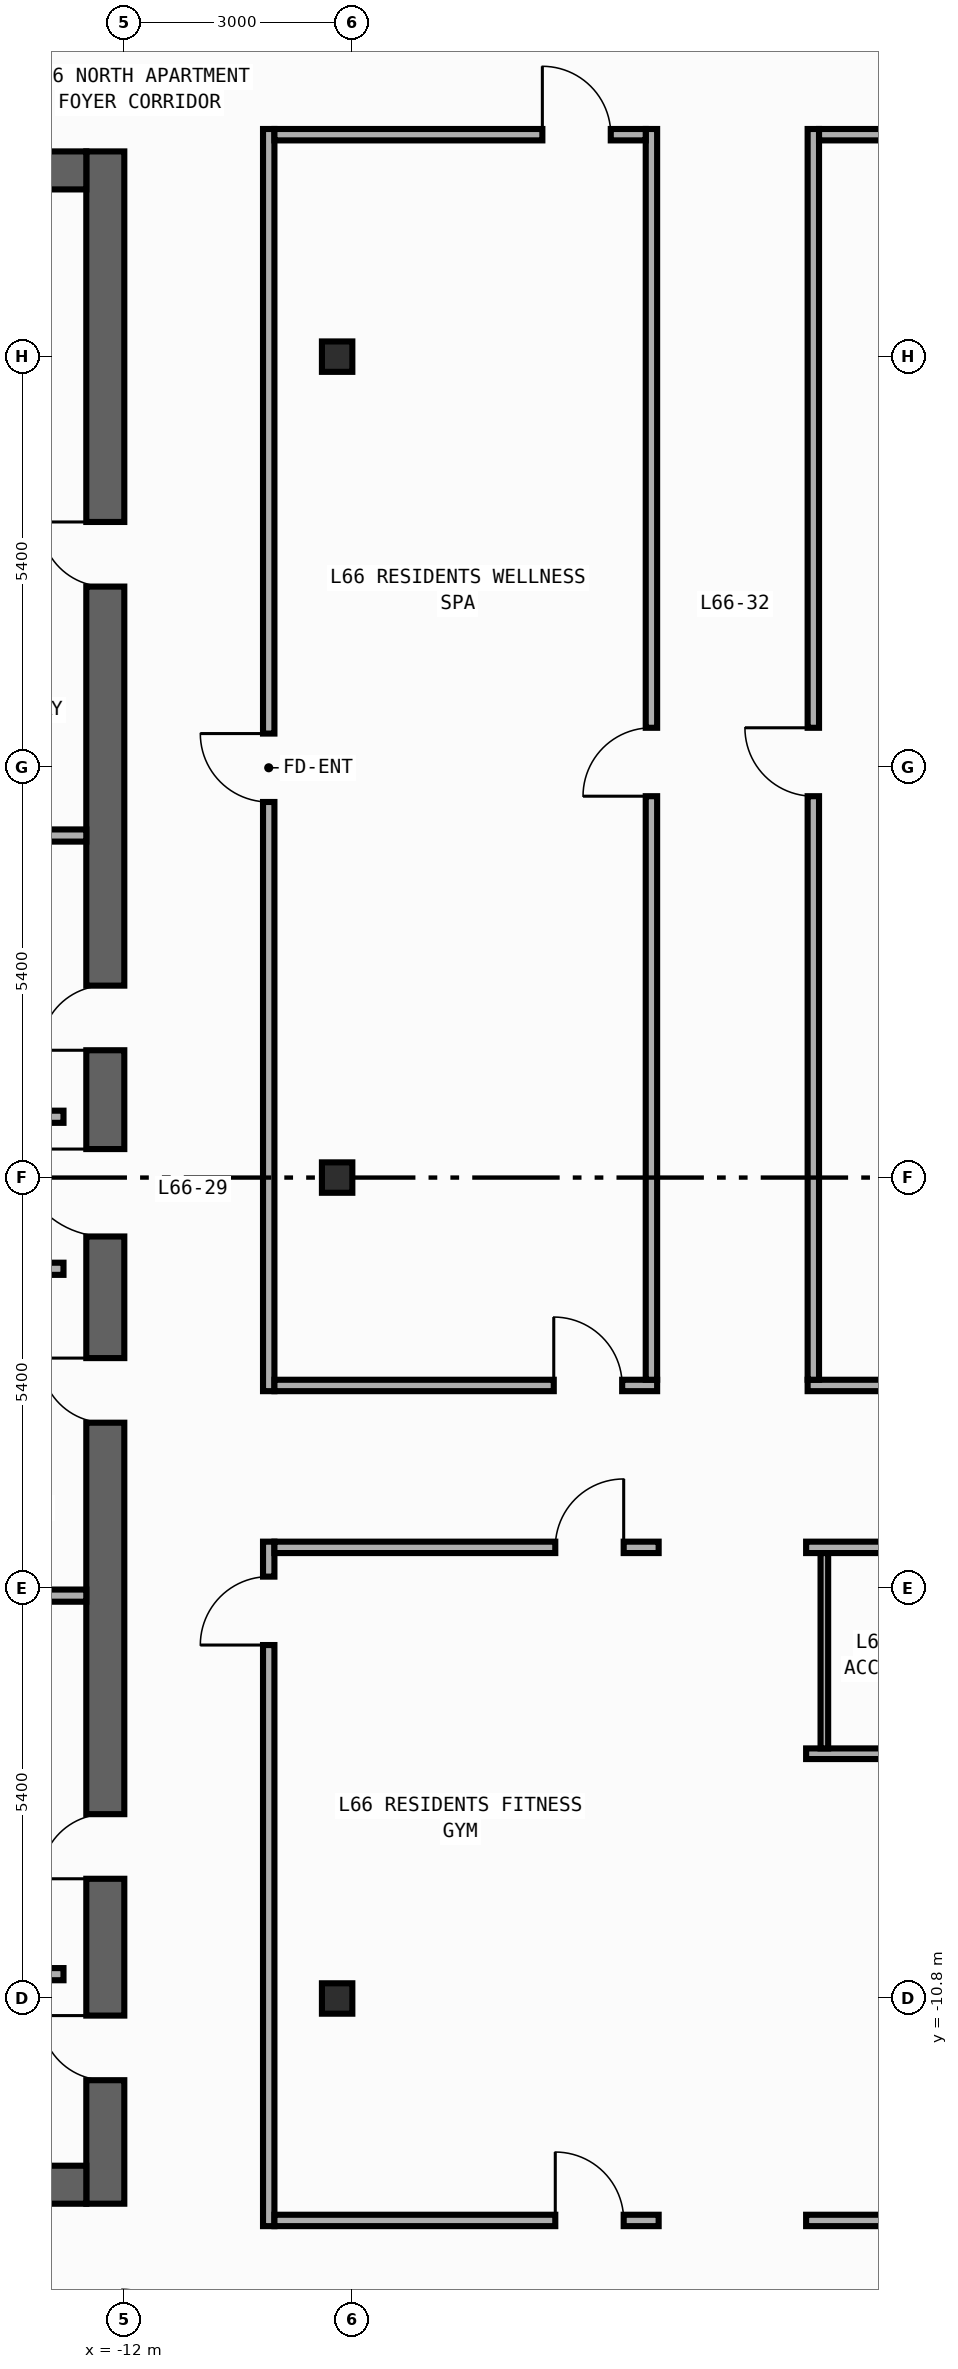
"""IFC4 building model, lengths in metres.
Left out: names, types, materials, properties, quantities, classifications, styles, units other than length and angle.
Written with IfcOpenShell. Run it as: python <this file> out.ifc"""

import sys

from ifc_helpers import new_model, si_unit, direction, frame, frame_2d, origin, origin_2d, place, context, subcontext, project, spatial, rectangle, i_section, extrude, element, fill, save


model = new_model("IFC4")
c1 = context("Model", 3, precision=1e-05, world=origin(), true_north=direction((0.0, 1.0)))
c2 = subcontext(c1, "Body", "Model", "MODEL_VIEW")
j1 = project(units=[si_unit("LENGTHUNIT", "METRE"), si_unit("PLANEANGLEUNIT", "RADIAN")], contexts=[c1])
p1 = place(None, origin())
s1 = spatial("IfcSite", under=j1, at=p1, CompositionType="ELEMENT")
p2 = place(p1, origin())
s2 = spatial("IfcBuilding", under=s1, at=p2, CompositionType="ELEMENT")
p3 = place(p2, frame((0.0, 0.0, 277.6)))
s3 = spatial("IfcBuildingStorey", under=s2, at=p3, CompositionType="ELEMENT", Elevation=277.6)
p4 = place(p3, frame((-12.25, -13.5, 0.0), z_axis=(0.0, 0.0, 1.0), x_axis=(0.0, 1.0, 0.0)))
e1 = element("IfcWall", 1, at=p4, inside=s3, PredefinedType="SHEAR", context=c2, shape_type="SweptSolid", body=[
    extrude(rectangle(XDim=27.0, YDim=0.5, at=frame_2d((13.5, 0.0))), origin(), (0.0, 0.0, 1.0), 3.54),
])
p5 = place(p4, frame((15.175, 0.0, 0.0)))
e2 = element("IfcOpeningElement", 2, at=p5, cuts=e1, PredefinedType="OPENING", context=c2, shape_type="SweptSolid", body=[
    extrude(rectangle(XDim=0.85, YDim=2.1, at=frame_2d((0.425, 1.05))), frame((0.0, 0.26, 0.0), z_axis=(0.0, -1.0, 0.0), x_axis=(1.0, 0.0, 0.0)), (0.0, 0.0, 1.0), 0.52),
])
p6 = place(p4, frame((21.275, 0.0, 0.0)))
e3 = element("IfcOpeningElement", 3, at=p6, cuts=e1, PredefinedType="OPENING", context=c2, shape_type="SweptSolid", body=[
    extrude(rectangle(XDim=0.85, YDim=2.1, at=frame_2d((0.425, 1.05))), frame((0.0, 0.26, 0.0), z_axis=(0.0, -1.0, 0.0), x_axis=(1.0, 0.0, 0.0)), (0.0, 0.0, 1.0), 0.52),
])
p7 = place(p4, frame((4.275, 0.0, 0.0)))
e4 = element("IfcOpeningElement", 4, at=p7, cuts=e1, PredefinedType="OPENING", context=c2, shape_type="SweptSolid", body=[
    extrude(rectangle(XDim=0.85, YDim=2.1, at=frame_2d((0.425, 1.05))), frame((0.0, 0.26, 0.0), z_axis=(0.0, -1.0, 0.0), x_axis=(1.0, 0.0, 0.0)), (0.0, 0.0, 1.0), 0.52),
])
p8 = place(p4, frame((10.275, 0.0, 0.0)))
e5 = element("IfcOpeningElement", 5, at=p8, cuts=e1, PredefinedType="OPENING", context=c2, shape_type="SweptSolid", body=[
    extrude(rectangle(XDim=0.85, YDim=2.1, at=frame_2d((0.425, 1.05))), frame((0.0, 0.26, 0.0), z_axis=(0.0, -1.0, 0.0), x_axis=(1.0, 0.0, 0.0)), (0.0, 0.0, 1.0), 0.52),
])
p9 = place(p4, frame((12.725, 0.0, 0.0)))
e6 = element("IfcOpeningElement", 6, at=p9, cuts=e1, PredefinedType="OPENING", context=c2, shape_type="SweptSolid", body=[
    extrude(rectangle(XDim=1.15, YDim=2.2, at=frame_2d((0.575, 1.1))), frame((0.0, 0.26, 0.0), z_axis=(0.0, -1.0, 0.0), x_axis=(1.0, 0.0, 0.0)), (0.0, 0.0, 1.0), 0.52),
])
p10 = place(p4, frame((1.625, 0.0, 0.0)))
e7 = element("IfcOpeningElement", 7, at=p10, cuts=e1, PredefinedType="OPENING", context=c2, shape_type="SweptSolid", body=[
    extrude(rectangle(XDim=0.85, YDim=2.1, at=frame_2d((0.425, 1.05))), frame((0.0, 0.26, 0.0), z_axis=(0.0, -1.0, 0.0), x_axis=(1.0, 0.0, 0.0)), (0.0, 0.0, 1.0), 0.52),
])
for number, where, z_axis, x_axis in (
    (8, (-19.9, -13.25, 0.0), (0.0, 0.0, 1.0), (1.0, 0.0, 0.0)),
    (9, (-19.9, 13.25, 0.0), (0.0, 0.0, 1.0), (1.0, 0.0, 0.0)),
):
    element("IfcWall", number, at=place(p3, frame(where, z_axis=z_axis, x_axis=x_axis)), inside=s3, PredefinedType="SHEAR", context=c2, shape_type="SweptSolid", body=[
        extrude(rectangle(XDim=7.4, YDim=0.5, at=frame_2d((3.7, 0.0))), origin(), (0.0, 0.0, 1.0), 3.54),
    ])
for number, where, z_axis, x_axis in (
    (10, (-9.2, -10.8, 0.0), (0.0, 0.0, 1.0), (1.0, 0.0, 0.0)),
    (11, (-9.2, 0.0, 0.0), (0.0, 0.0, 1.0), (1.0, 0.0, 0.0)),
    (12, (-9.2, 10.8, 0.0), (0.0, 0.0, 1.0), (1.0, 0.0, 0.0)),
):
    element("IfcColumn", number, at=place(p3, frame(where, z_axis=z_axis, x_axis=x_axis)), inside=s3, PredefinedType="COLUMN", context=c2, shape_type="SweptSolid", body=[
        extrude(i_section(OverallWidth=0.4, OverallDepth=0.4, WebThickness=0.013, FlangeThickness=0.021, FilletRadius=0.022, at=origin_2d()), origin(), (0.0, 0.0, 1.0), 3.8),
    ])
for number, where, z_axis, x_axis in (
    (13, (-15.4, 0.8, 0.0), (0.0, 0.0, 1.0), (1.0, 0.0, 0.0)),
    (14, (-15.4, -1.2, 0.0), (0.0, 0.0, 1.0), (1.0, 0.0, 0.0)),
    (15, (-15.4, -10.48, 0.0), (0.0, 0.0, 1.0), (1.0, 0.0, 0.0)),
):
    element("IfcWall", number, at=place(p3, frame(where, z_axis=z_axis, x_axis=x_axis)), inside=s3, PredefinedType="STANDARD", context=c2, shape_type="SweptSolid", body=[
        extrude(rectangle(XDim=2.6, YDim=0.16, at=frame_2d((1.3, 0.0))), origin(), (0.0, 0.0, 1.0), 3.54),
    ])
for number, where, z_axis, x_axis in (
    (16, (-15.4, 4.5, 0.0), (0.0, 0.0, 1.0), (1.0, 0.0, 0.0)),
    (17, (-15.4, -5.5, 0.0), (0.0, 0.0, 1.0), (1.0, 0.0, 0.0)),
):
    element("IfcWall", number, at=place(p3, frame(where, z_axis=z_axis, x_axis=x_axis)), inside=s3, PredefinedType="PARTITIONING", context=c2, shape_type="SweptSolid", body=[
        extrude(rectangle(XDim=2.9, YDim=0.16, at=frame_2d((1.45, 0.0))), origin(), (0.0, 0.0, 1.0), 3.54),
    ])
p11 = place(p3, frame((-10.1, -2.81, 0.0), z_axis=(0.0, 0.0, 1.0), x_axis=(0.0, 1.0, 0.0)))
e18 = element("IfcWall", 18, at=p11, inside=s3, PredefinedType="PARTITIONING", context=c2, shape_type="SweptSolid", body=[
    extrude(rectangle(XDim=16.605, YDim=0.15, at=frame_2d((8.302, 0.0))), origin(), (0.0, 0.0, 1.0), 3.54),
])
p12 = place(p11, frame((7.751, 0.0, 0.0)))
e19 = element("IfcOpeningElement", 19, at=p12, cuts=e18, PredefinedType="OPENING", context=c2, shape_type="SweptSolid", body=[
    extrude(rectangle(XDim=0.9, YDim=2.15, at=frame_2d((0.45, 1.075))), frame((0.0, 0.085, 0.0), z_axis=(0.0, -1.0, 0.0), x_axis=(1.0, 0.0, 0.0)), (0.0, 0.0, 1.0), 0.17),
])
p13 = place(p3, frame((-10.1, -13.795, 0.0), z_axis=(0.0, 0.0, 1.0), x_axis=(0.0, 1.0, 0.0)))
e20 = element("IfcWall", 20, at=p13, inside=s3, PredefinedType="PARTITIONING", context=c2, shape_type="SweptSolid", body=[
    extrude(rectangle(XDim=9.005, YDim=0.15, at=frame_2d((4.502, 0.0))), origin(), (0.0, 0.0, 1.0), 3.54),
])
p14 = place(p13, frame((7.645, 0.0, 0.0)))
e21 = element("IfcOpeningElement", 21, at=p14, cuts=e20, PredefinedType="OPENING", context=c2, shape_type="SweptSolid", body=[
    extrude(rectangle(XDim=0.9, YDim=2.15, at=frame_2d((0.45, 1.075))), frame((0.0, 0.085, 0.0), z_axis=(0.0, -1.0, 0.0), x_axis=(1.0, 0.0, 0.0)), (0.0, 0.0, 1.0), 0.17),
])
p15 = place(p3, frame((-10.025, -2.735, 0.0), z_axis=(0.0, 0.0, 1.0), x_axis=(1.0, 0.0, 0.0)))
e22 = element("IfcWall", 22, at=p15, inside=s3, PredefinedType="PARTITIONING", context=c2, shape_type="SweptSolid", body=[
    extrude(rectangle(XDim=5.035, YDim=0.15, at=frame_2d((2.518, 0.0))), origin(), (0.0, 0.0, 1.0), 3.54),
])
p16 = place(p15, frame((3.675, 0.0, 0.0)))
e23 = element("IfcOpeningElement", 23, at=p16, cuts=e22, PredefinedType="OPENING", context=c2, shape_type="SweptSolid", body=[
    extrude(rectangle(XDim=0.9, YDim=2.15, at=frame_2d((0.45, 1.075))), frame((0.0, 0.085, 0.0), z_axis=(0.0, -1.0, 0.0), x_axis=(1.0, 0.0, 0.0)), (0.0, 0.0, 1.0), 0.17),
])
p17 = place(p3, frame((-10.025, -4.865, 0.0), z_axis=(0.0, 0.0, 1.0), x_axis=(1.0, 0.0, 0.0)))
e24 = element("IfcWall", 24, at=p17, inside=s3, PredefinedType="PARTITIONING", context=c2, shape_type="SweptSolid", body=[
    extrude(rectangle(XDim=5.055, YDim=0.15, at=frame_2d((2.527, 0.0))), origin(), (0.0, 0.0, 1.0), 3.54),
])
p18 = place(p17, frame((3.695, 0.0, 0.0)))
e25 = element("IfcOpeningElement", 25, at=p18, cuts=e24, PredefinedType="OPENING", context=c2, shape_type="SweptSolid", body=[
    extrude(rectangle(XDim=0.9, YDim=2.15, at=frame_2d((0.45, 1.075))), frame((0.0, 0.085, 0.0), z_axis=(0.0, -1.0, 0.0), x_axis=(1.0, 0.0, 0.0)), (0.0, 0.0, 1.0), 0.17),
])
p19 = place(p3, frame((-3.01, -2.735, 0.0), z_axis=(0.0, 0.0, 1.0), x_axis=(1.0, 0.0, 0.0)))
e26 = element("IfcWall", 26, at=p19, inside=s3, PredefinedType="PARTITIONING", context=c2, shape_type="SweptSolid", body=[
    extrude(rectangle(XDim=13.035, YDim=0.15, at=frame_2d((6.518, 0.0))), origin(), (0.0, 0.0, 1.0), 3.54),
])
p20 = place(p19, frame((2.463, 0.0, 0.0)))
e27 = element("IfcOpeningElement", 27, at=p20, cuts=e26, PredefinedType="OPENING", context=c2, shape_type="SweptSolid", body=[
    extrude(rectangle(XDim=0.9, YDim=2.15, at=frame_2d((0.45, 1.075))), frame((0.0, 0.085, 0.0), z_axis=(0.0, -1.0, 0.0), x_axis=(1.0, 0.0, 0.0)), (0.0, 0.0, 1.0), 0.17),
])
p21 = place(p3, frame((-3.03, -4.865, 0.0), z_axis=(0.0, 0.0, 1.0), x_axis=(1.0, 0.0, 0.0)))
e28 = element("IfcWall", 28, at=p21, inside=s3, PredefinedType="PARTITIONING", context=c2, shape_type="SweptSolid", body=[
    extrude(rectangle(XDim=3.07, YDim=0.15, at=frame_2d((1.535, 0.0))), origin(), (0.0, 0.0, 1.0), 3.54),
])
p22 = place(p21, frame((1.71, 0.0, 0.0)))
e29 = element("IfcOpeningElement", 29, at=p22, cuts=e28, PredefinedType="OPENING", context=c2, shape_type="SweptSolid", body=[
    extrude(rectangle(XDim=0.9, YDim=2.15, at=frame_2d((0.45, 1.075))), frame((0.0, 0.085, 0.0), z_axis=(0.0, -1.0, 0.0), x_axis=(1.0, 0.0, 0.0)), (0.0, 0.0, 1.0), 0.17),
])
p23 = place(p3, frame((-5.065, -2.66, 0.0), z_axis=(0.0, 0.0, 1.0), x_axis=(0.0, 1.0, 0.0)))
e30 = element("IfcWall", 30, at=p23, inside=s3, PredefinedType="PARTITIONING", context=c2, shape_type="SweptSolid", body=[
    extrude(rectangle(XDim=16.455, YDim=0.15, at=frame_2d((8.228, 0.0))), origin(), (0.0, 0.0, 1.0), 3.19),
])
p24 = place(p23, frame((7.677, 0.0, 0.0)))
e31 = element("IfcOpeningElement", 31, at=p24, cuts=e30, PredefinedType="OPENING", context=c2, shape_type="SweptSolid", body=[
    extrude(rectangle(XDim=0.9, YDim=2.15, at=frame_2d((0.45, 1.075))), frame((0.0, 0.085, 0.0), z_axis=(0.0, -1.0, 0.0), x_axis=(1.0, 0.0, 0.0)), (0.0, 0.0, 1.0), 0.17),
])
p25 = place(p3, frame((-2.935, -2.66, 0.0), z_axis=(0.0, 0.0, 1.0), x_axis=(0.0, 1.0, 0.0)))
e32 = element("IfcWall", 32, at=p25, inside=s3, PredefinedType="PARTITIONING", context=c2, shape_type="SweptSolid", body=[
    extrude(rectangle(XDim=16.455, YDim=0.15, at=frame_2d((8.228, 0.0))), origin(), (0.0, 0.0, 1.0), 3.54),
])
p26 = place(p25, frame((7.677, 0.0, 0.0)))
e33 = element("IfcOpeningElement", 33, at=p26, cuts=e32, PredefinedType="OPENING", context=c2, shape_type="SweptSolid", body=[
    extrude(rectangle(XDim=0.9, YDim=2.15, at=frame_2d((0.45, 1.075))), frame((0.0, 0.085, 0.0), z_axis=(0.0, -1.0, 0.0), x_axis=(1.0, 0.0, 0.0)), (0.0, 0.0, 1.0), 0.17),
])
p27 = place(p3, frame((-10.025, 13.72, 0.0), z_axis=(0.0, 0.0, 1.0), x_axis=(1.0, 0.0, 0.0)))
e34 = element("IfcWall", 34, at=p27, inside=s3, PredefinedType="PARTITIONING", context=c2, shape_type="SweptSolid", body=[
    extrude(rectangle(XDim=4.885, YDim=0.15, at=frame_2d((2.442, 0.0))), origin(), (0.0, 0.0, 1.0), 3.54),
])
p28 = place(p27, frame((3.525, 0.0, 0.0)))
e35 = element("IfcOpeningElement", 35, at=p28, cuts=e34, PredefinedType="OPENING", context=c2, shape_type="SweptSolid", body=[
    extrude(rectangle(XDim=0.9, YDim=2.15, at=frame_2d((0.45, 1.075))), frame((0.0, 0.085, 0.0), z_axis=(0.0, -1.0, 0.0), x_axis=(1.0, 0.0, 0.0)), (0.0, 0.0, 1.0), 0.17),
])
p29 = place(p3, frame((-2.86, 13.72, 0.0), z_axis=(0.0, 0.0, 1.0), x_axis=(1.0, 0.0, 0.0)))
e36 = element("IfcWall", 36, at=p29, inside=s3, PredefinedType="PARTITIONING", context=c2, shape_type="SweptSolid", body=[
    extrude(rectangle(XDim=12.885, YDim=0.15, at=frame_2d((6.442, 0.0))), origin(), (0.0, 0.0, 1.0), 3.54),
])
p30 = place(p29, frame((4.692, 0.0, 0.0)))
e37 = element("IfcOpeningElement", 37, at=p30, cuts=e36, PredefinedType="OPENING", context=c2, shape_type="SweptSolid", body=[
    extrude(rectangle(XDim=0.9, YDim=2.15, at=frame_2d((0.45, 1.075))), frame((0.0, 0.085, 0.0), z_axis=(0.0, -1.0, 0.0), x_axis=(1.0, 0.0, 0.0)), (0.0, 0.0, 1.0), 0.17),
])
p31 = place(p3, frame((-10.025, -13.72, 0.0), z_axis=(0.0, 0.0, 1.0), x_axis=(1.0, 0.0, 0.0)))
e38 = element("IfcWall", 38, at=p31, inside=s3, PredefinedType="PARTITIONING", context=c2, shape_type="SweptSolid", body=[
    extrude(rectangle(XDim=5.055, YDim=0.15, at=frame_2d((2.527, 0.0))), origin(), (0.0, 0.0, 1.0), 3.54),
])
p32 = place(p31, frame((3.695, 0.0, 0.0)))
e39 = element("IfcOpeningElement", 39, at=p32, cuts=e38, PredefinedType="OPENING", context=c2, shape_type="SweptSolid", body=[
    extrude(rectangle(XDim=0.9, YDim=2.15, at=frame_2d((0.45, 1.075))), frame((0.0, 0.085, 0.0), z_axis=(0.0, -1.0, 0.0), x_axis=(1.0, 0.0, 0.0)), (0.0, 0.0, 1.0), 0.17),
])
p33 = place(p3, frame((-3.03, -13.72, 0.0), z_axis=(0.0, 0.0, 1.0), x_axis=(1.0, 0.0, 0.0)))
e40 = element("IfcWall", 40, at=p33, inside=s3, PredefinedType="PARTITIONING", context=c2, shape_type="SweptSolid", body=[
    extrude(rectangle(XDim=13.055, YDim=0.15, at=frame_2d((6.527, 0.0))), origin(), (0.0, 0.0, 1.0), 3.54),
])
p34 = place(p33, frame((4.874, 0.0, 0.0)))
e41 = element("IfcOpeningElement", 41, at=p34, cuts=e40, PredefinedType="OPENING", context=c2, shape_type="SweptSolid", body=[
    extrude(rectangle(XDim=0.9, YDim=2.15, at=frame_2d((0.45, 1.075))), frame((0.0, 0.085, 0.0), z_axis=(0.0, -1.0, 0.0), x_axis=(1.0, 0.0, 0.0)), (0.0, 0.0, 1.0), 0.17),
])
p35 = place(p3, frame((-3.03, -7.58, 0.0), z_axis=(0.0, 0.0, 1.0), x_axis=(1.0, 0.0, 0.0)))
e42 = element("IfcWall", 42, at=p35, inside=s3, PredefinedType="PARTITIONING", context=c2, shape_type="SweptSolid", body=[
    extrude(rectangle(XDim=3.07, YDim=0.14, at=frame_2d((1.535, 0.0))), origin(), (0.0, 0.0, 1.0), 3.54),
])
p36 = place(p3, frame((-2.79, -7.51, 0.0), z_axis=(0.0, 0.0, 1.0), x_axis=(0.0, 1.0, 0.0)))
e43 = element("IfcWall", 43, at=p36, inside=s3, PredefinedType="PARTITIONING", context=c2, shape_type="SweptSolid", body=[
    extrude(rectangle(XDim=2.57, YDim=0.1, at=frame_2d((1.285, 0.0))), origin(), (0.0, 0.0, 1.0), 3.54),
])
p37 = place(p5, origin())
e44 = element("IfcDoor", 44, at=p37, inside=s3, OperationType="SINGLE_SWING_LEFT", PredefinedType="DOOR", context=c2, shape_type="SweptSolid", body=[
    extrude(rectangle(XDim=0.85, YDim=2.1, at=frame_2d((0.425, 1.05))), frame((0.0, 0.025, 0.0), z_axis=(0.0, -1.0, 0.0), x_axis=(1.0, 0.0, 0.0)), (0.0, 0.0, 1.0), 0.05),
])
fill(e2, e44)
p38 = place(p6, origin())
e45 = element("IfcDoor", 45, at=p38, inside=s3, OperationType="SINGLE_SWING_RIGHT", PredefinedType="DOOR", context=c2, shape_type="SweptSolid", body=[
    extrude(rectangle(XDim=0.85, YDim=2.1, at=frame_2d((0.425, 1.05))), frame((0.0, 0.025, 0.0), z_axis=(0.0, -1.0, 0.0), x_axis=(1.0, 0.0, 0.0)), (0.0, 0.0, 1.0), 0.05),
])
fill(e3, e45)
p39 = place(p7, origin())
e46 = element("IfcDoor", 46, at=p39, inside=s3, OperationType="SINGLE_SWING_LEFT", PredefinedType="DOOR", context=c2, shape_type="SweptSolid", body=[
    extrude(rectangle(XDim=0.85, YDim=2.1, at=frame_2d((0.425, 1.05))), frame((0.0, 0.025, 0.0), z_axis=(0.0, -1.0, 0.0), x_axis=(1.0, 0.0, 0.0)), (0.0, 0.0, 1.0), 0.05),
])
fill(e4, e46)
p40 = place(p8, origin())
e47 = element("IfcDoor", 47, at=p40, inside=s3, OperationType="SINGLE_SWING_RIGHT", PredefinedType="DOOR", context=c2, shape_type="SweptSolid", body=[
    extrude(rectangle(XDim=0.85, YDim=2.1, at=frame_2d((0.425, 1.05))), frame((0.0, 0.025, 0.0), z_axis=(0.0, -1.0, 0.0), x_axis=(1.0, 0.0, 0.0)), (0.0, 0.0, 1.0), 0.05),
])
fill(e5, e47)
p41 = place(p9, origin())
e48 = element("IfcDoor", 48, at=p41, inside=s3, OperationType="SINGLE_SWING_RIGHT", PredefinedType="DOOR", context=c2, shape_type="SweptSolid", body=[
    extrude(rectangle(XDim=1.15, YDim=2.2, at=frame_2d((0.575, 1.1))), frame((0.0, 0.025, 0.0), z_axis=(0.0, -1.0, 0.0), x_axis=(1.0, 0.0, 0.0)), (0.0, 0.0, 1.0), 0.05),
])
fill(e6, e48)
p42 = place(p10, origin())
e49 = element("IfcDoor", 49, at=p42, inside=s3, OperationType="SINGLE_SWING_RIGHT", PredefinedType="DOOR", context=c2, shape_type="SweptSolid", body=[
    extrude(rectangle(XDim=0.85, YDim=2.1, at=frame_2d((0.425, 1.05))), frame((0.0, 0.025, 0.0), z_axis=(0.0, -1.0, 0.0), x_axis=(1.0, 0.0, 0.0)), (0.0, 0.0, 1.0), 0.05),
])
fill(e7, e49)
p43 = place(p12, origin())
e50 = element("IfcDoor", 50, at=p43, inside=s3, OperationType="SINGLE_SWING_RIGHT", PredefinedType="DOOR", context=c2, shape_type="SweptSolid", body=[
    extrude(rectangle(XDim=0.9, YDim=2.15, at=frame_2d((0.45, 1.075))), frame((0.0, 0.025, 0.0), z_axis=(0.0, -1.0, 0.0), x_axis=(1.0, 0.0, 0.0)), (0.0, 0.0, 1.0), 0.05),
])
fill(e19, e50)
p44 = place(p14, origin())
e51 = element("IfcDoor", 51, at=p44, inside=s3, OperationType="SINGLE_SWING_LEFT", PredefinedType="DOOR", context=c2, shape_type="SweptSolid", body=[
    extrude(rectangle(XDim=0.9, YDim=2.15, at=frame_2d((0.45, 1.075))), frame((0.0, 0.025, 0.0), z_axis=(0.0, -1.0, 0.0), x_axis=(1.0, 0.0, 0.0)), (0.0, 0.0, 1.0), 0.05),
])
fill(e21, e51)
p45 = place(p16, origin())
e52 = element("IfcDoor", 52, at=p45, inside=s3, OperationType="SINGLE_SWING_LEFT", PredefinedType="DOOR", context=c2, shape_type="SweptSolid", body=[
    extrude(rectangle(XDim=0.9, YDim=2.15, at=frame_2d((0.45, 1.075))), frame((0.0, 0.025, 0.0), z_axis=(0.0, -1.0, 0.0), x_axis=(1.0, 0.0, 0.0)), (0.0, 0.0, 1.0), 0.05),
])
fill(e23, e52)
p46 = place(p18, origin())
e53 = element("IfcDoor", 53, at=p46, inside=s3, OperationType="SINGLE_SWING_RIGHT", PredefinedType="DOOR", context=c2, shape_type="SweptSolid", body=[
    extrude(rectangle(XDim=0.9, YDim=2.15, at=frame_2d((0.45, 1.075))), frame((0.0, 0.025, 0.0), z_axis=(0.0, -1.0, 0.0), x_axis=(1.0, 0.0, 0.0)), (0.0, 0.0, 1.0), 0.05),
])
fill(e25, e53)
p47 = place(p24, origin())
e54 = element("IfcDoor", 54, at=p47, inside=s3, OperationType="SINGLE_SWING_LEFT", PredefinedType="DOOR", context=c2, shape_type="SweptSolid", body=[
    extrude(rectangle(XDim=0.9, YDim=2.15, at=frame_2d((0.45, 1.075))), frame((0.0, 0.025, 0.0), z_axis=(0.0, -1.0, 0.0), x_axis=(1.0, 0.0, 0.0)), (0.0, 0.0, 1.0), 0.05),
])
fill(e31, e54)
p48 = place(p26, origin())
e55 = element("IfcDoor", 55, at=p48, inside=s3, OperationType="SINGLE_SWING_RIGHT", PredefinedType="DOOR", context=c2, shape_type="SweptSolid", body=[
    extrude(rectangle(XDim=0.9, YDim=2.15, at=frame_2d((0.45, 1.075))), frame((0.0, 0.025, 0.0), z_axis=(0.0, -1.0, 0.0), x_axis=(1.0, 0.0, 0.0)), (0.0, 0.0, 1.0), 0.05),
])
fill(e33, e55)
p49 = place(p28, origin())
e56 = element("IfcDoor", 56, at=p49, inside=s3, OperationType="SINGLE_SWING_LEFT", PredefinedType="DOOR", context=c2, shape_type="SweptSolid", body=[
    extrude(rectangle(XDim=0.9, YDim=2.15, at=frame_2d((0.45, 1.075))), frame((0.0, 0.025, 0.0), z_axis=(0.0, -1.0, 0.0), x_axis=(1.0, 0.0, 0.0)), (0.0, 0.0, 1.0), 0.05),
])
fill(e35, e56)
p50 = place(p32, origin())
e57 = element("IfcDoor", 57, at=p50, inside=s3, OperationType="SINGLE_SWING_LEFT", PredefinedType="DOOR", context=c2, shape_type="SweptSolid", body=[
    extrude(rectangle(XDim=0.9, YDim=2.15, at=frame_2d((0.45, 1.075))), frame((0.0, 0.025, 0.0), z_axis=(0.0, -1.0, 0.0), x_axis=(1.0, 0.0, 0.0)), (0.0, 0.0, 1.0), 0.05),
])
fill(e39, e57)
save(model, sys.argv[1])
